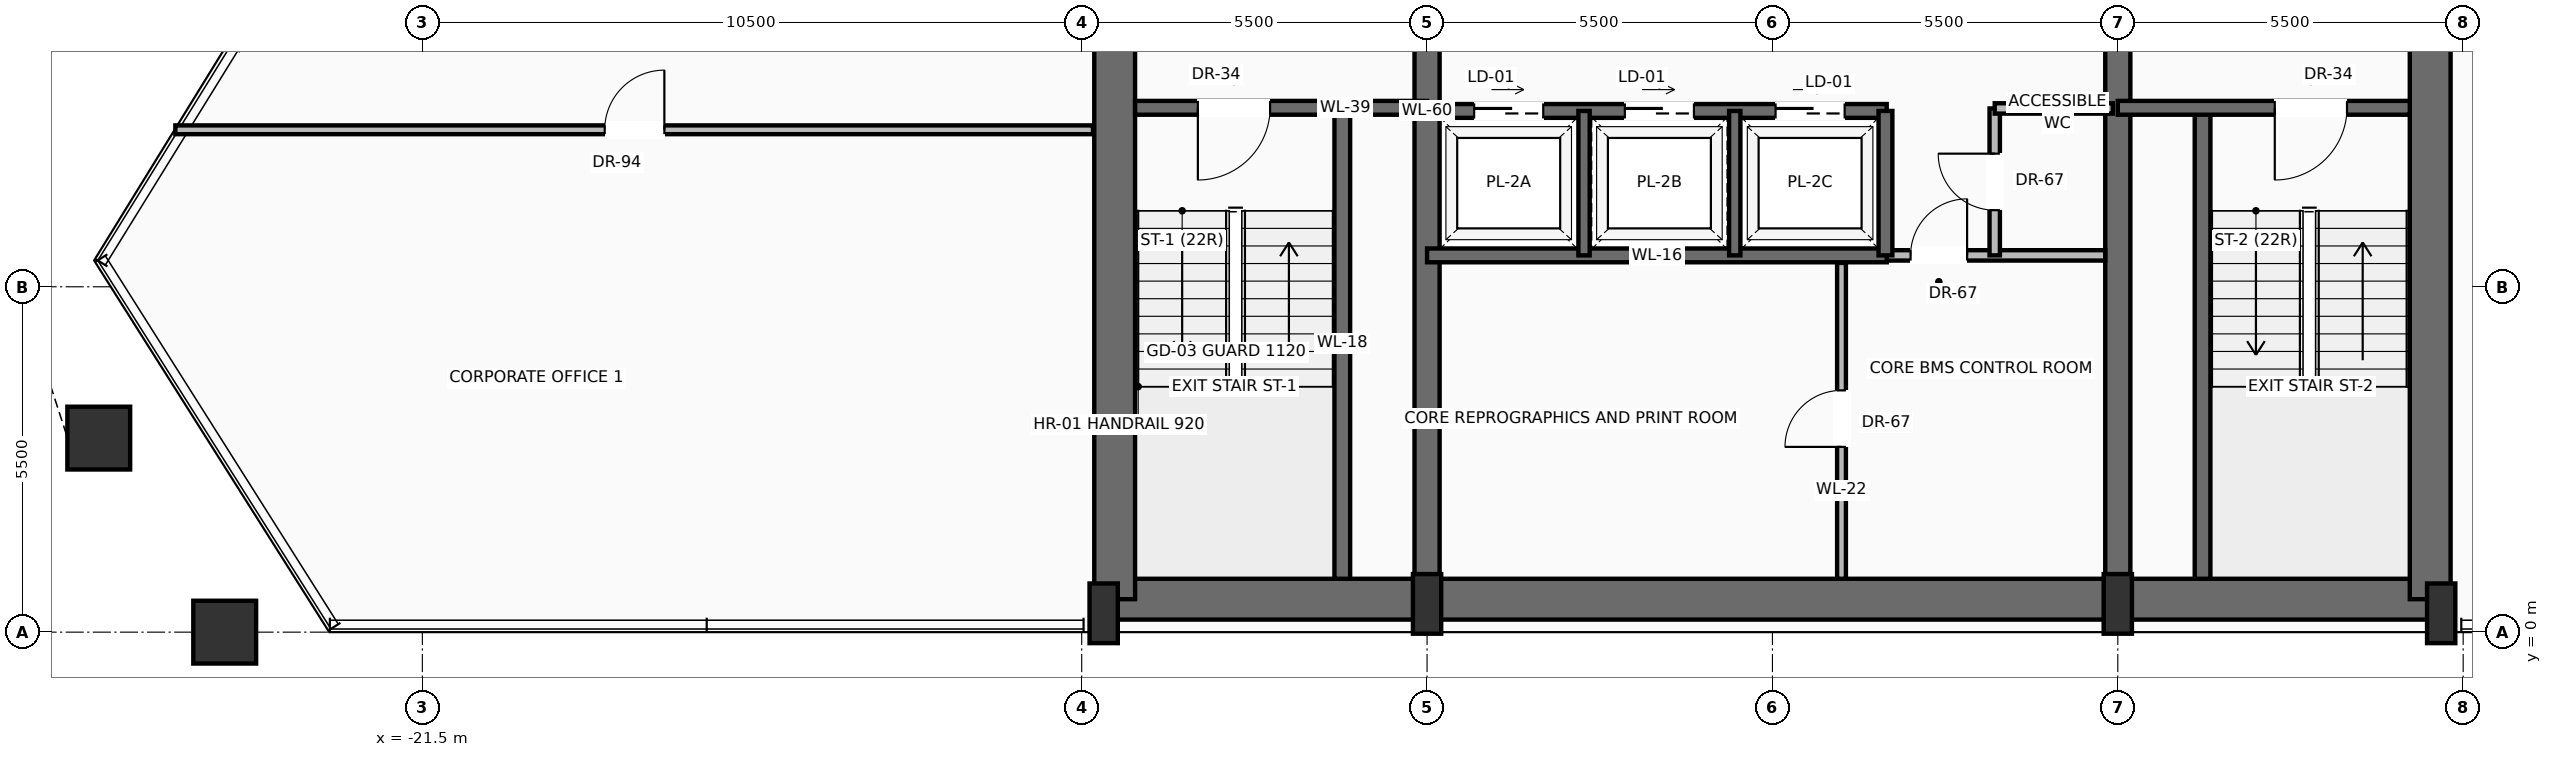
"""IFC4 building model, lengths in metres.
Left out: names, types, materials, properties, quantities, classifications, styles, units other than length and angle.
Written with IfcOpenShell. Run it as: python <this file> out.ifc"""

import sys

from ifc_helpers import new_model, si_unit, direction, frame, frame_2d, origin, origin_2d, place, context, subcontext, project, spatial, rectangle, hollow_rectangle, extrude, source, transform, mapped, element, fill, save


model = new_model("IFC4")
c1 = context("Model", 3, precision=1e-05, world=origin(), true_north=direction((0.0, 1.0)))
c2 = subcontext(c1, "Body", "Model", "MODEL_VIEW")
j1 = project(units=[si_unit("LENGTHUNIT", "METRE"), si_unit("PLANEANGLEUNIT", "RADIAN")], contexts=[c1])
p1 = place(None, origin())
s1 = spatial("IfcSite", under=j1, at=p1, CompositionType="ELEMENT")
p2 = place(p1, origin())
s2 = spatial("IfcBuilding", under=s1, at=p2, CompositionType="ELEMENT")
p3 = place(p2, frame((0.0, 0.0, 193.2)))
s3 = spatial("IfcBuildingStorey", under=s2, at=p3, CompositionType="ELEMENT", Elevation=193.2)
p4 = place(p3, frame((-10.65, 0.525, 0.0), z_axis=(0.0, 0.0, 1.0), x_axis=(1.0, 0.0, 0.0)))
e1 = element("IfcWall", 1, at=p4, inside=s3, PredefinedType="SHEAR", context=c2, shape_type="SweptSolid", body=[
    extrude(rectangle(XDim=21.3, YDim=0.65, at=frame_2d((10.65, 0.0))), origin(), (0.0, 0.0, 1.0), 3.47),
])
for number, where, z_axis, x_axis in (
    (2, (-10.475, 0.525, 0.0), (0.0, 0.0, 1.0), (0.0, 1.0, 0.0)),
    (3, (10.475, 0.525, 0.0), (0.0, 0.0, 1.0), (0.0, 1.0, 0.0)),
):
    element("IfcWall", number, at=place(p3, frame(where, z_axis=z_axis, x_axis=x_axis)), inside=s3, PredefinedType="SHEAR", context=c2, shape_type="SweptSolid", body=[
        extrude(rectangle(XDim=15.55, YDim=0.65, at=frame_2d((7.775, 0.0))), origin(), (0.0, 0.0, 1.0), 3.47),
    ])
p5 = place(p3, frame((-5.5, 0.525, 0.0), z_axis=(0.0, 0.0, 1.0), x_axis=(0.0, 1.0, 0.0)))
e4 = element("IfcWall", 4, at=p5, inside=s3, PredefinedType="SHEAR", context=c2, shape_type="SweptSolid", body=[
    extrude(rectangle(XDim=15.55, YDim=0.4, at=frame_2d((7.775, 0.0))), origin(), (0.0, 0.0, 1.0), 3.47),
])
p6 = place(p5, frame((8.975, 0.0, 0.0)))
e5 = element("IfcOpeningElement", 5, at=p6, cuts=e4, PredefinedType="OPENING", context=c2, shape_type="SweptSolid", body=[
    extrude(rectangle(XDim=1.1, YDim=2.2, at=frame_2d((0.55, 1.1))), frame((0.0, 0.21, 0.0), z_axis=(0.0, -1.0, 0.0), x_axis=(1.0, 0.0, 0.0)), (0.0, 0.0, 1.0), 0.42),
])
p7 = place(p3, frame((5.5, 0.525, 0.0), z_axis=(0.0, 0.0, 1.0), x_axis=(0.0, 1.0, 0.0)))
e6 = element("IfcWall", 6, at=p7, inside=s3, PredefinedType="SHEAR", context=c2, shape_type="SweptSolid", body=[
    extrude(rectangle(XDim=15.55, YDim=0.4, at=frame_2d((7.775, 0.0))), origin(), (0.0, 0.0, 1.0), 3.47),
])
p8 = place(p7, frame((8.975, 0.0, 0.0)))
e7 = element("IfcOpeningElement", 7, at=p8, cuts=e6, PredefinedType="OPENING", context=c2, shape_type="SweptSolid", body=[
    extrude(rectangle(XDim=1.1, YDim=2.2, at=frame_2d((0.55, 1.1))), frame((0.0, 0.21, 0.0), z_axis=(0.0, -1.0, 0.0), x_axis=(1.0, 0.0, 0.0)), (0.0, 0.0, 1.0), 0.42),
])
m1 = source(origin(), c2, "Body", "SweptSolid", [
    extrude(rectangle(XDim=0.45, YDim=0.95, at=origin_2d()), origin(), (0.0, 0.0, 1.0), 3.7),
])
for number, where, z_axis, x_axis in (
    (8, (-10.65, 0.3, 0.0), (0.0, 0.0, 1.0), (1.0, 0.0, 0.0)),
    (9, (-5.5, 0.45, 0.0), (0.0, 0.0, 1.0), (1.0, 0.0, 0.0)),
    (10, (5.5, 0.45, 0.0), (0.0, 0.0, 1.0), (1.0, 0.0, 0.0)),
    (11, (10.65, 0.3, 0.0), (0.0, 0.0, 1.0), (1.0, 0.0, 0.0)),
):
    element("IfcColumn", number, at=place(p3, frame(where, z_axis=z_axis, x_axis=x_axis)), inside=s3, PredefinedType="PILASTER", context=c2, shape_type="MappedRepresentation", body=[
        mapped(m1, transform((0.0, 0.0, 0.0), scale=1.0)),
    ])
m2 = source(origin(), c2, "Body", "SweptSolid", [
    extrude(hollow_rectangle(XDim=1.0, YDim=1.0, WallThickness=0.05, at=origin_2d()), origin(), (0.0, 0.0, 1.0), 3.691),
])
p9 = place(p3, frame((-24.647, 0.0, 0.004), z_axis=(-0.006680186945, 0.0, 0.999977687302), x_axis=(0.0, -1.0, 0.0)))
e12 = element("IfcColumn", 12, at=p9, inside=s3, PredefinedType="COLUMN", context=c2, shape_type="MappedRepresentation", body=[
    mapped(m2, transform((0.0, 0.0, 0.0), scale=1.0)),
])
m3 = source(origin(), c2, "Body", "SweptSolid", [
    extrude(hollow_rectangle(XDim=1.0, YDim=1.0, WallThickness=0.05, at=origin_2d()), origin(), (0.0, 0.0, 1.0), 3.692),
])
p10 = place(p3, frame((-26.653, 3.09, 0.004), z_axis=(0.003703487274, -0.015343018706, 0.999875430221), x_axis=(0.972082208573, 0.234640533104, 0.0)))
e13 = element("IfcColumn", 13, at=p10, inside=s3, PredefinedType="COLUMN", context=c2, shape_type="MappedRepresentation", body=[
    mapped(m3, transform((0.0, 0.0, 0.0), scale=1.0)),
])
p11 = place(p3, frame((-6.85, 0.85, 0.0), z_axis=(0.0, 0.0, 1.0), x_axis=(0.0, 1.0, 0.0)))
e14 = element("IfcWall", 14, at=p11, inside=s3, PredefinedType="SOLIDWALL", context=c2, shape_type="SweptSolid", body=[
    extrude(rectangle(XDim=7.5, YDim=0.25, at=frame_2d((3.75, 0.0))), origin(), (0.0, 0.0, 1.0), 3.47),
])
p12 = place(p3, frame((-5.5, 8.35, 0.0), z_axis=(0.0, 0.0, 1.0), x_axis=(-1.0, 0.0, 0.0)))
e15 = element("IfcWall", 15, at=p12, inside=s3, PredefinedType="SOLIDWALL", context=c2, shape_type="SweptSolid", body=[
    extrude(rectangle(XDim=4.65, YDim=0.22, at=frame_2d((2.325, 0.0))), origin(), (0.0, 0.0, 1.0), 3.47),
])
p13 = place(p12, frame((2.5, 0.0, 0.0)))
e16 = element("IfcOpeningElement", 16, at=p13, cuts=e15, PredefinedType="OPENING", context=c2, shape_type="SweptSolid", body=[
    extrude(rectangle(XDim=1.15, YDim=2.2, at=frame_2d((0.575, 1.1))), frame((0.0, 0.12, 0.0), z_axis=(0.0, -1.0, 0.0), x_axis=(1.0, 0.0, 0.0)), (0.0, 0.0, 1.0), 0.24),
])
p14 = place(p3, frame((6.85, 0.85, 0.0), z_axis=(0.0, 0.0, 1.0), x_axis=(0.0, 1.0, 0.0)))
e17 = element("IfcWall", 17, at=p14, inside=s3, PredefinedType="SOLIDWALL", context=c2, shape_type="SweptSolid", body=[
    extrude(rectangle(XDim=7.5, YDim=0.25, at=frame_2d((3.75, 0.0))), origin(), (0.0, 0.0, 1.0), 3.47),
])
p15 = place(p3, frame((10.15, 8.35, 0.0), z_axis=(0.0, 0.0, 1.0), x_axis=(-1.0, 0.0, 0.0)))
e18 = element("IfcWall", 18, at=p15, inside=s3, PredefinedType="SOLIDWALL", context=c2, shape_type="SweptSolid", body=[
    extrude(rectangle(XDim=4.65, YDim=0.22, at=frame_2d((2.325, 0.0))), origin(), (0.0, 0.0, 1.0), 3.47),
])
p16 = place(p15, frame((1.0, 0.0, 0.0)))
e19 = element("IfcOpeningElement", 19, at=p16, cuts=e18, PredefinedType="OPENING", context=c2, shape_type="SweptSolid", body=[
    extrude(rectangle(XDim=1.15, YDim=2.2, at=frame_2d((0.575, 1.1))), frame((0.0, 0.12, 0.0), z_axis=(0.0, -1.0, 0.0), x_axis=(1.0, 0.0, 0.0)), (0.0, 0.0, 1.0), 0.24),
])
p17 = place(p3, frame((1.82, 6.0, 0.0), z_axis=(0.0, 0.0, 1.0), x_axis=(1.0, 0.0, 0.0)))
e20 = element("IfcWall", 20, at=p17, inside=s3, PredefinedType="PARTITIONING", context=c2, shape_type="SweptSolid", body=[
    extrude(rectangle(XDim=3.48, YDim=0.165, at=frame_2d((1.74, 0.0))), origin(), (0.0, 0.0, 1.0), 3.462),
])
p18 = place(p17, frame((0.38, 0.0, 0.0)))
e21 = element("IfcOpeningElement", 21, at=p18, cuts=e20, PredefinedType="OPENING", context=c2, shape_type="SweptSolid", body=[
    extrude(rectangle(XDim=0.9, YDim=2.1, at=frame_2d((0.45, 1.05))), frame((0.0, 0.093, 0.0), z_axis=(0.0, -1.0, 0.0), x_axis=(1.0, 0.0, 0.0)), (0.0, 0.0, 1.0), 0.185),
])
p19 = place(p3, frame((1.1, 0.85, 0.0), z_axis=(0.0, 0.0, 1.0), x_axis=(0.0, 1.0, 0.0)))
e22 = element("IfcWall", 22, at=p19, inside=s3, PredefinedType="PARTITIONING", context=c2, shape_type="SweptSolid", body=[
    extrude(rectangle(XDim=5.03, YDim=0.14, at=frame_2d((2.515, 0.0))), origin(), (0.0, 0.0, 1.0), 3.462),
])
p20 = place(p19, frame((2.1, 0.0, 0.0)))
e23 = element("IfcOpeningElement", 23, at=p20, cuts=e22, PredefinedType="OPENING", context=c2, shape_type="SweptSolid", body=[
    extrude(rectangle(XDim=0.9, YDim=2.1, at=frame_2d((0.45, 1.05))), frame((0.0, 0.08, 0.0), z_axis=(0.0, -1.0, 0.0), x_axis=(1.0, 0.0, 0.0)), (0.0, 0.0, 1.0), 0.16),
])
p21 = place(p3, frame((3.54, 6.0, 0.0), z_axis=(0.0, 0.0, 1.0), x_axis=(0.0, 1.0, 0.0)))
e24 = element("IfcWall", 24, at=p21, inside=s3, PredefinedType="PARTITIONING", context=c2, shape_type="SweptSolid", body=[
    extrude(rectangle(XDim=2.34, YDim=0.165, at=frame_2d((1.17, 0.0))), origin(), (0.0, 0.0, 1.0), 3.462),
])
p22 = place(p21, frame((0.72, 0.0, 0.0)))
e25 = element("IfcOpeningElement", 25, at=p22, cuts=e24, PredefinedType="OPENING", context=c2, shape_type="SweptSolid", body=[
    extrude(rectangle(XDim=0.9, YDim=2.1, at=frame_2d((0.45, 1.05))), frame((0.0, 0.093, 0.0), z_axis=(0.0, -1.0, 0.0), x_axis=(1.0, 0.0, 0.0)), (0.0, 0.0, 1.0), 0.185),
])
p23 = place(p3, frame((3.54, 8.34, 0.0), z_axis=(0.0, 0.0, 1.0), x_axis=(1.0, 0.0, 0.0)))
e26 = element("IfcWall", 26, at=p23, inside=s3, PredefinedType="PARTITIONING", context=c2, shape_type="SweptSolid", body=[
    extrude(rectangle(XDim=1.88, YDim=0.165, at=frame_2d((0.94, 0.0))), origin(), (0.0, 0.0, 1.0), 3.462),
])
p24 = place(p3, frame((-5.5, 6.0, 0.0), z_axis=(0.0, 0.0, 1.0), x_axis=(1.0, 0.0, 0.0)))
e27 = element("IfcWall", 27, at=p24, inside=s3, PredefinedType="SOLIDWALL", context=c2, shape_type="SweptSolid", body=[
    extrude(rectangle(XDim=7.32, YDim=0.22, at=frame_2d((3.66, 0.0))), origin(), (0.0, 0.0, 1.0), 3.47),
])
p25 = place(p3, frame((-5.5, 8.3, 0.0), z_axis=(0.0, 0.0, 1.0), x_axis=(1.0, 0.0, 0.0)))
e28 = element("IfcWall", 28, at=p25, inside=s3, PredefinedType="SOLIDWALL", context=c2, shape_type="SweptSolid", body=[
    extrude(rectangle(XDim=7.32, YDim=0.22, at=frame_2d((3.66, 0.0))), origin(), (0.0, 0.0, 1.0), 3.47),
])
p26 = place(p25, frame((0.75, 0.0, 0.0)))
e29 = element("IfcOpeningElement", 29, at=p26, cuts=e28, PredefinedType="OPENING", context=c2, shape_type="SweptSolid", body=[
    extrude(rectangle(XDim=1.1, YDim=2.2, at=frame_2d((0.55, 1.1))), frame((0.0, 0.12, 0.0), z_axis=(0.0, -1.0, 0.0), x_axis=(1.0, 0.0, 0.0)), (0.0, 0.0, 1.0), 0.24),
])
p27 = place(p25, frame((3.15, 0.0, 0.0)))
e30 = element("IfcOpeningElement", 30, at=p27, cuts=e28, PredefinedType="OPENING", context=c2, shape_type="SweptSolid", body=[
    extrude(rectangle(XDim=1.1, YDim=2.2, at=frame_2d((0.55, 1.1))), frame((0.0, 0.12, 0.0), z_axis=(0.0, -1.0, 0.0), x_axis=(1.0, 0.0, 0.0)), (0.0, 0.0, 1.0), 0.24),
])
p28 = place(p25, frame((5.55, 0.0, 0.0)))
e31 = element("IfcOpeningElement", 31, at=p28, cuts=e28, PredefinedType="OPENING", context=c2, shape_type="SweptSolid", body=[
    extrude(rectangle(XDim=1.1, YDim=2.2, at=frame_2d((0.55, 1.1))), frame((0.0, 0.12, 0.0), z_axis=(0.0, -1.0, 0.0), x_axis=(1.0, 0.0, 0.0)), (0.0, 0.0, 1.0), 0.24),
])
p29 = place(p3, frame((1.8, 6.0, 0.0), z_axis=(0.0, 0.0, 1.0), x_axis=(0.0, 1.0, 0.0)))
e32 = element("IfcWall", 32, at=p29, inside=s3, PredefinedType="SOLIDWALL", context=c2, shape_type="SweptSolid", body=[
    extrude(rectangle(XDim=2.3, YDim=0.22, at=frame_2d((1.15, 0.0))), origin(), (0.0, 0.0, 1.0), 3.47),
])
for number, where, z_axis, x_axis in (
    (33, (-3.0, 6.0, 0.0), (0.0, 0.0, 1.0), (0.0, 1.0, 0.0)),
    (34, (-0.6, 6.0, 0.0), (0.0, 0.0, 1.0), (0.0, 1.0, 0.0)),
):
    element("IfcWall", number, at=place(p3, frame(where, z_axis=z_axis, x_axis=x_axis)), inside=s3, PredefinedType="SOLIDWALL", context=c2, shape_type="SweptSolid", body=[
        extrude(rectangle(XDim=2.3, YDim=0.18, at=frame_2d((1.15, 0.0))), origin(), (0.0, 0.0, 1.0), 3.47),
    ])
p30 = place(p3, frame((-25.434, 8.0, 0.0), z_axis=(0.0, 0.0, 1.0), x_axis=(1.0, 0.0, 0.0)))
e35 = element("IfcWall", 35, at=p30, inside=s3, PredefinedType="PARTITIONING", context=c2, shape_type="SweptSolid", body=[
    extrude(rectangle(XDim=14.614, YDim=0.14, at=frame_2d((7.307, 0.0))), origin(), (0.0, 0.0, 1.0), 3.462),
])
p31 = place(p30, frame((6.838, 0.0, 0.0)))
e36 = element("IfcOpeningElement", 36, at=p31, cuts=e35, PredefinedType="OPENING", context=c2, shape_type="SweptSolid", body=[
    extrude(rectangle(XDim=0.95, YDim=2.2, at=frame_2d((0.475, 1.1))), frame((0.0, 0.08, 0.0), z_axis=(0.0, -1.0, 0.0), x_axis=(1.0, 0.0, 0.0)), (0.0, 0.0, 1.0), 0.16),
])
m4 = source(origin(), c2, "Body", "SweptSolid", [
    extrude(rectangle(XDim=1.15, YDim=2.2, at=frame_2d((0.575, 1.1))), frame((0.0, 0.025, 0.0), z_axis=(0.0, -1.0, 0.0), x_axis=(1.0, 0.0, 0.0)), (0.0, 0.0, 1.0), 0.05),
])
p32 = place(p13, origin())
e37 = element("IfcDoor", 37, at=p32, inside=s3, OperationType="SINGLE_SWING_RIGHT", PredefinedType="DOOR", context=c2, shape_type="MappedRepresentation", body=[
    mapped(m4, transform((0.0, 0.0, 0.0), scale=1.0)),
])
fill(e16, e37)
p33 = place(p16, origin())
e38 = element("IfcDoor", 38, at=p33, inside=s3, OperationType="SINGLE_SWING_RIGHT", PredefinedType="DOOR", context=c2, shape_type="MappedRepresentation", body=[
    mapped(m4, transform((0.0, 0.0, 0.0), scale=1.0)),
])
fill(e19, e38)
m5 = source(origin(), c2, "Body", "SweptSolid", [
    extrude(rectangle(XDim=0.9, YDim=2.1, at=frame_2d((0.45, 1.05))), frame((0.0, 0.025, 0.0), z_axis=(0.0, -1.0, 0.0), x_axis=(1.0, 0.0, 0.0)), (0.0, 0.0, 1.0), 0.05),
])
p34 = place(p18, origin())
e39 = element("IfcDoor", 39, at=p34, inside=s3, OperationType="SINGLE_SWING_RIGHT", PredefinedType="DOOR", context=c2, shape_type="MappedRepresentation", body=[
    mapped(m5, transform((0.0, 0.0, 0.0), scale=1.0)),
])
fill(e21, e39)
p35 = place(p20, origin())
e40 = element("IfcDoor", 40, at=p35, inside=s3, OperationType="SINGLE_SWING_LEFT", PredefinedType="DOOR", context=c2, shape_type="MappedRepresentation", body=[
    mapped(m5, transform((0.0, 0.0, 0.0), scale=1.0)),
])
fill(e23, e40)
p36 = place(p22, origin())
e41 = element("IfcDoor", 41, at=p36, inside=s3, OperationType="SINGLE_SWING_RIGHT", PredefinedType="DOOR", context=c2, shape_type="MappedRepresentation", body=[
    mapped(m5, transform((0.0, 0.0, 0.0), scale=1.0)),
])
fill(e25, e41)
m6 = source(origin(), c2, "Body", "SweptSolid", [
    extrude(rectangle(XDim=1.1, YDim=2.2, at=frame_2d((0.55, 1.1))), frame((0.0, 0.025, 0.0), z_axis=(0.0, -1.0, 0.0), x_axis=(1.0, 0.0, 0.0)), (0.0, 0.0, 1.0), 0.05),
])
p37 = place(p26, origin())
e42 = element("IfcDoor", 42, at=p37, inside=s3, OperationType="SLIDING_TO_LEFT", PredefinedType="DOOR", context=c2, shape_type="MappedRepresentation", body=[
    mapped(m6, transform((0.0, 0.0, 0.0), scale=1.0)),
])
fill(e29, e42)
p38 = place(p27, origin())
e43 = element("IfcDoor", 43, at=p38, inside=s3, OperationType="SLIDING_TO_LEFT", PredefinedType="DOOR", context=c2, shape_type="MappedRepresentation", body=[
    mapped(m6, transform((0.0, 0.0, 0.0), scale=1.0)),
])
fill(e30, e43)
p39 = place(p28, origin())
e44 = element("IfcDoor", 44, at=p39, inside=s3, OperationType="SLIDING_TO_LEFT", PredefinedType="DOOR", context=c2, shape_type="MappedRepresentation", body=[
    mapped(m6, transform((0.0, 0.0, 0.0), scale=1.0)),
])
fill(e31, e44)
m7 = source(origin(), c2, "Body", "SweptSolid", [
    extrude(rectangle(XDim=0.95, YDim=2.2, at=frame_2d((0.475, 1.1))), frame((0.0, 0.025, 0.0), z_axis=(0.0, -1.0, 0.0), x_axis=(1.0, 0.0, 0.0)), (0.0, 0.0, 1.0), 0.05),
])
p40 = place(p31, origin())
e45 = element("IfcDoor", 45, at=p40, inside=s3, OperationType="SINGLE_SWING_RIGHT", PredefinedType="DOOR", context=c2, shape_type="MappedRepresentation", body=[
    mapped(m7, transform((0.0, 0.0, 0.0), scale=1.0)),
])
fill(e36, e45)
save(model, sys.argv[1])
